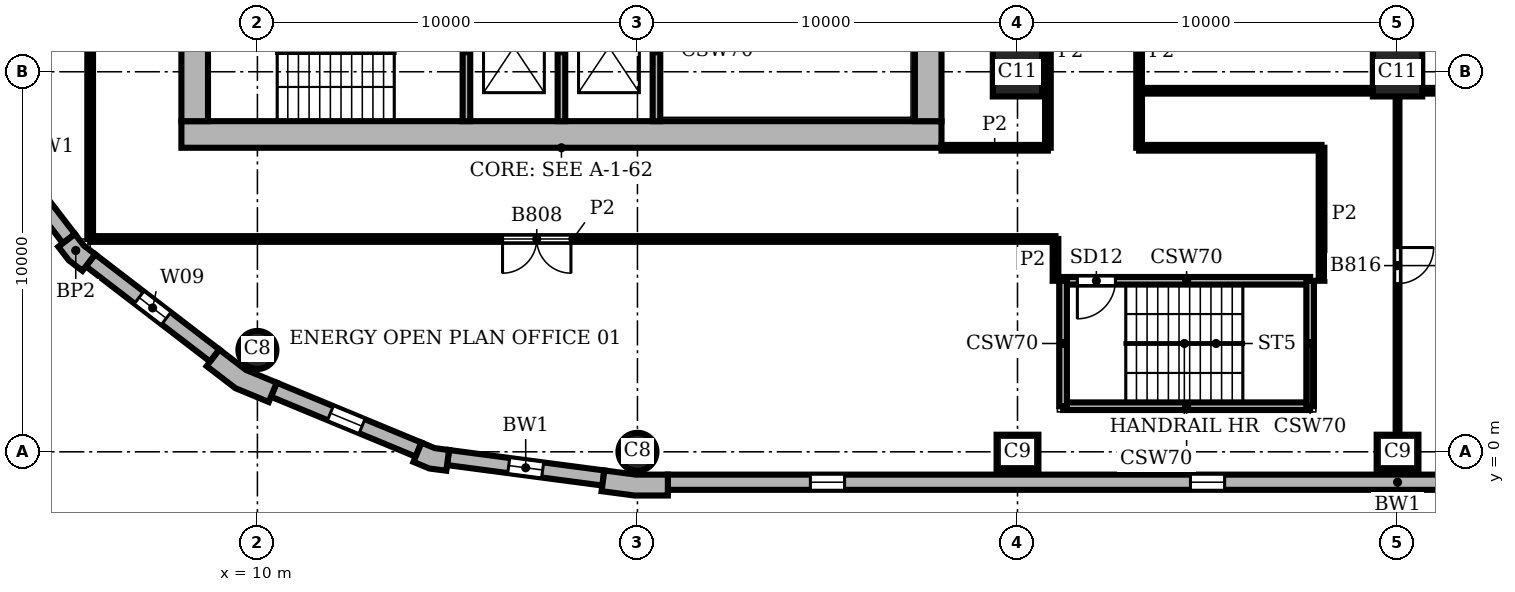
"""IFC4 building model, lengths in metres.
Left out: names, types, materials, properties, quantities, classifications, styles, units other than length and angle.
Written with IfcOpenShell. Run it as: python <this file> out.ifc"""

import sys

from ifc_helpers import new_model, si_unit, direction, frame, frame_2d, origin, origin_2d, place, context, subcontext, project, spatial, polyline, rectangle, circle, outline, extrude, element, fill, save


model = new_model("IFC4")
c1 = context("Model", 3, precision=1e-05, world=origin(), true_north=direction((0.0, 1.0)))
c2 = subcontext(c1, "Body", "Model", "MODEL_VIEW")
j1 = project(units=[si_unit("LENGTHUNIT", "METRE"), si_unit("PLANEANGLEUNIT", "RADIAN")], contexts=[c1])
p1 = place(None, origin())
s1 = spatial("IfcSite", under=j1, at=p1, CompositionType="ELEMENT")
p2 = place(p1, origin())
s2 = spatial("IfcBuilding", under=s1, at=p2, CompositionType="ELEMENT")
p3 = place(p2, frame((0.0, 0.0, 213.6)))
s3 = spatial("IfcBuildingStorey", under=s2, at=p3, CompositionType="ELEMENT", Elevation=213.6)
p4 = place(p3, frame((20.0, 0.0, 0.0), z_axis=(0.0, 0.0, 1.0), x_axis=(1.0, 0.0, 0.0)))
e1 = element("IfcColumn", 1, at=p4, inside=s3, PredefinedType="COLUMN", context=c2, shape_type="SweptSolid", body=[
    extrude(circle(Radius=0.5, at=origin_2d()), origin(), (0.0, 0.0, 1.0), 3.9),
])
for number, where, z_axis, x_axis in (
    (2, (30.0, 0.0, 0.0), (0.0, 0.0, 1.0), (1.0, 0.0, 0.0)),
    (3, (40.0, 0.0, 0.0), (0.0, 0.0, 1.0), (1.0, 0.0, 0.0)),
):
    element("IfcColumn", number, at=place(p3, frame(where, z_axis=z_axis, x_axis=x_axis)), inside=s3, PredefinedType="COLUMN", context=c2, shape_type="SweptSolid", body=[
        extrude(rectangle(XDim=1.1, YDim=0.9, at=origin_2d()), origin(), (0.0, 0.0, 1.0), 3.9),
    ])
p5 = place(p3, frame((10.0, 2.679, 0.0), z_axis=(0.0, 0.0, 1.0), x_axis=(1.0, 0.0, 0.0)))
e4 = element("IfcColumn", 4, at=p5, inside=s3, PredefinedType="COLUMN", context=c2, shape_type="SweptSolid", body=[
    extrude(circle(Radius=0.5, at=origin_2d()), origin(), (0.0, 0.0, 1.0), 3.9),
])
for number, where, z_axis, x_axis in (
    (5, (30.0, 10.0, 0.0), (0.0, 0.0, 1.0), (1.0, 0.0, 0.0)),
    (6, (40.0, 10.0, 0.0), (0.0, 0.0, 1.0), (1.0, 0.0, 0.0)),
):
    element("IfcColumn", number, at=place(p3, frame(where, z_axis=z_axis, x_axis=x_axis)), inside=s3, PredefinedType="COLUMN", context=c2, shape_type="SweptSolid", body=[
        extrude(rectangle(XDim=1.3, YDim=1.3, at=origin_2d()), origin(), (0.0, 0.0, 1.0), 3.9),
    ])
p6 = place(p3, frame((8.0, 8.35, 0.0), z_axis=(0.0, 0.0, 1.0), x_axis=(1.0, 0.0, 0.0)))
e7 = element("IfcWall", 7, at=p6, inside=s3, PredefinedType="SHEAR", context=c2, shape_type="SweptSolid", body=[
    extrude(rectangle(XDim=20.0, YDim=0.7, at=frame_2d((10.0, 0.0))), origin(), (0.0, 0.0, 1.0), 3.9),
])
p7 = place(p3, frame((27.65, 8.7, 0.0), z_axis=(0.0, 0.0, 1.0), x_axis=(0.0, 1.0, 0.0)))
e8 = element("IfcWall", 8, at=p7, inside=s3, PredefinedType="SHEAR", context=c2, shape_type="SweptSolid", body=[
    extrude(rectangle(XDim=18.6, YDim=0.7, at=frame_2d((9.3, 0.0))), origin(), (0.0, 0.0, 1.0), 3.9),
])
p8 = place(p7, frame((4.75, 0.0, 0.0)))
e9 = element("IfcOpeningElement", 9, at=p8, cuts=e8, PredefinedType="OPENING", context=c2, shape_type="SweptSolid", body=[
    extrude(rectangle(XDim=1.6, YDim=2.1, at=frame_2d((0.8, 1.05))), frame((0.0, 0.36, 0.0), z_axis=(0.0, -1.0, 0.0), x_axis=(1.0, 0.0, 0.0)), (0.0, 0.0, 1.0), 0.72),
])
p9 = place(p3, frame((8.35, 27.3, 0.0), z_axis=(0.0, 0.0, 1.0), x_axis=(0.0, -1.0, 0.0)))
e10 = element("IfcWall", 10, at=p9, inside=s3, PredefinedType="SHEAR", context=c2, shape_type="SweptSolid", body=[
    extrude(rectangle(XDim=18.6, YDim=0.7, at=frame_2d((9.3, 0.0))), origin(), (0.0, 0.0, 1.0), 3.9),
])
p10 = place(p3, origin())
e11 = element("IfcWall", 11, at=p10, inside=s3, PredefinedType="SOLIDWALL", context=c2, shape_type="SweptSolid", body=[
    extrude(outline(polyline([(19.076, -0.887), (19.057, -1.036), (19.925, -1.15), (20.8, -1.15), (20.8, -1.0), (20.8, -0.6), (19.961, -0.6), (19.128, -0.49), (19.076, -0.887)])), origin(), (0.0, 0.0, 1.0), 3.9),
])
e12 = element("IfcWall", 12, at=p10, inside=s3, PredefinedType="SOLIDWALL", context=c2, shape_type="SweptSolid", body=[
    extrude(outline(polyline([(4.882, 5.487), (4.763, 5.396), (5.038, 5.038), (5.396, 4.763), (5.487, 4.882), (5.731, 5.199), (5.43, 5.43), (5.199, 5.731), (4.882, 5.487)])), origin(), (0.0, 0.0, 1.0), 3.9),
])
e13 = element("IfcWall", 13, at=p10, inside=s3, PredefinedType="SOLIDWALL", context=c2, shape_type="SweptSolid", body=[
    extrude(outline(polyline([(8.757, 2.373), (8.665, 2.254), (9.42, 1.675), (10.299, 1.311), (10.356, 1.449), (10.51, 1.819), (9.698, 2.155), (9.0, 2.69), (8.757, 2.373)])), origin(), (0.0, 0.0, 1.0), 3.9),
])
e14 = element("IfcWall", 14, at=p10, inside=s3, PredefinedType="SOLIDWALL", context=c2, shape_type="SweptSolid", body=[
    extrude(outline(polyline([(14.164, -0.128), (14.106, -0.266), (14.523, -0.439), (14.971, -0.498), (14.99, -0.349), (15.043, 0.047), (14.667, 0.097), (14.317, 0.242), (14.164, -0.128)])), origin(), (0.0, 0.0, 1.0), 3.9),
])
p11 = place(p3, frame((20.8, -0.8, 0.0), z_axis=(0.0, 0.0, 1.0), x_axis=(1.0, 0.0, 0.0)))
e15 = element("IfcWall", 15, at=p11, inside=s3, PredefinedType="SOLIDWALL", context=c2, shape_type="SweptSolid", body=[
    extrude(rectangle(XDim=38.4, YDim=0.4, at=frame_2d((19.2, 0.0))), origin(), (0.0, 0.0, 1.0), 3.9),
])
p12 = place(p11, frame((3.75, 0.0, 0.9)))
e16 = element("IfcOpeningElement", 16, at=p12, cuts=e15, PredefinedType="OPENING", context=c2, shape_type="SweptSolid", body=[
    extrude(rectangle(XDim=0.9, YDim=2.35, at=frame_2d((0.45, 1.175))), frame((0.0, 0.21, 0.0), z_axis=(0.0, -1.0, 0.0), x_axis=(1.0, 0.0, 0.0)), (0.0, 0.0, 1.0), 0.42),
])
p13 = place(p11, frame((13.75, 0.0, 0.9)))
e17 = element("IfcOpeningElement", 17, at=p13, cuts=e15, PredefinedType="OPENING", context=c2, shape_type="SweptSolid", body=[
    extrude(rectangle(XDim=0.9, YDim=2.35, at=frame_2d((0.45, 1.175))), frame((0.0, 0.21, 0.0), z_axis=(0.0, -1.0, 0.0), x_axis=(1.0, 0.0, 0.0)), (0.0, 0.0, 1.0), 0.42),
])
p14 = place(p11, frame((23.75, 0.0, 0.9)))
e18 = element("IfcOpeningElement", 18, at=p14, cuts=e15, PredefinedType="OPENING", context=c2, shape_type="SweptSolid", body=[
    extrude(rectangle(XDim=0.9, YDim=2.35, at=frame_2d((0.45, 1.175))), frame((0.0, 0.21, 0.0), z_axis=(0.0, -1.0, 0.0), x_axis=(1.0, 0.0, 0.0)), (0.0, 0.0, 1.0), 0.42),
])
p15 = place(p11, frame((33.75, 0.0, 0.9)))
e19 = element("IfcOpeningElement", 19, at=p15, cuts=e15, PredefinedType="OPENING", context=c2, shape_type="SweptSolid", body=[
    extrude(rectangle(XDim=0.9, YDim=2.35, at=frame_2d((0.45, 1.175))), frame((0.0, 0.21, 0.0), z_axis=(0.0, -1.0, 0.0), x_axis=(1.0, 0.0, 0.0)), (0.0, 0.0, 1.0), 0.42),
])
p16 = place(p3, frame((2.532, 8.878, 0.0), z_axis=(0.0, 0.0, 1.0), x_axis=(0.608759824817, -0.793354571229, 0.0)))
e20 = element("IfcWall", 20, at=p16, inside=s3, PredefinedType="SOLIDWALL", context=c2, shape_type="SweptSolid", body=[
    extrude(rectangle(XDim=4.121, YDim=0.4, at=frame_2d((2.061, 0.0))), origin(), (0.0, 0.0, 1.0), 3.9),
])
p17 = place(p16, frame((1.611, 0.0, 0.9)))
e21 = element("IfcOpeningElement", 21, at=p17, cuts=e20, PredefinedType="OPENING", context=c2, shape_type="SweptSolid", body=[
    extrude(rectangle(XDim=0.9, YDim=2.35, at=frame_2d((0.45, 1.175))), frame((0.0, 0.21, 0.0), z_axis=(0.0, -1.0, 0.0), x_axis=(1.0, 0.0, 0.0)), (0.0, 0.0, 1.0), 0.42),
])
p18 = place(p3, frame((5.609, 5.041, 0.0), z_axis=(0.0, 0.0, 1.0), x_axis=(0.793354571229, -0.608759824817, 0.0)))
e22 = element("IfcWall", 22, at=p18, inside=s3, PredefinedType="SOLIDWALL", context=c2, shape_type="SweptSolid", body=[
    extrude(rectangle(XDim=4.121, YDim=0.4, at=frame_2d((2.061, 0.0))), origin(), (0.0, 0.0, 1.0), 3.9),
])
p19 = place(p18, frame((1.611, 0.0, 0.9)))
e23 = element("IfcOpeningElement", 23, at=p19, cuts=e22, PredefinedType="OPENING", context=c2, shape_type="SweptSolid", body=[
    extrude(rectangle(XDim=0.9, YDim=2.35, at=frame_2d((0.45, 1.175))), frame((0.0, 0.21, 0.0), z_axis=(0.0, -1.0, 0.0), x_axis=(1.0, 0.0, 0.0)), (0.0, 0.0, 1.0), 0.42),
])
p20 = place(p3, frame((10.433, 1.634, 0.0), z_axis=(0.0, 0.0, 1.0), x_axis=(0.923863744394, -0.382721546029, 0.0)))
e24 = element("IfcWall", 24, at=p20, inside=s3, PredefinedType="SOLIDWALL", context=c2, shape_type="SweptSolid", body=[
    extrude(rectangle(XDim=4.121, YDim=0.4, at=frame_2d((2.061, 0.0))), origin(), (0.0, 0.0, 1.0), 3.9),
])
p21 = place(p20, frame((1.611, 0.0, 0.9)))
e25 = element("IfcOpeningElement", 25, at=p21, cuts=e24, PredefinedType="OPENING", context=c2, shape_type="SweptSolid", body=[
    extrude(rectangle(XDim=0.9, YDim=2.35, at=frame_2d((0.45, 1.175))), frame((0.0, 0.21, 0.0), z_axis=(0.0, -1.0, 0.0), x_axis=(1.0, 0.0, 0.0)), (0.0, 0.0, 1.0), 0.42),
])
p22 = place(p3, frame((15.017, -0.151, 0.0), z_axis=(0.0, 0.0, 1.0), x_axis=(0.991446429508, -0.130514280502, 0.0)))
e26 = element("IfcWall", 26, at=p22, inside=s3, PredefinedType="SOLIDWALL", context=c2, shape_type="SweptSolid", body=[
    extrude(rectangle(XDim=4.121, YDim=0.4, at=frame_2d((2.061, 0.0))), origin(), (0.0, 0.0, 1.0), 3.9),
])
p23 = place(p22, frame((1.611, 0.0, 0.9)))
e27 = element("IfcOpeningElement", 27, at=p23, cuts=e26, PredefinedType="OPENING", context=c2, shape_type="SweptSolid", body=[
    extrude(rectangle(XDim=0.9, YDim=2.35, at=frame_2d((0.45, 1.175))), frame((0.0, 0.21, 0.0), z_axis=(0.0, -1.0, 0.0), x_axis=(1.0, 0.0, 0.0)), (0.0, 0.0, 1.0), 0.42),
])
p24 = place(p3, frame((31.2, 1.2, 0.0), z_axis=(0.0, 0.0, 1.0), x_axis=(1.0, 0.0, 0.0)))
e28 = element("IfcWall", 28, at=p24, inside=s3, PredefinedType="SHEAR", context=c2, shape_type="SweptSolid", body=[
    extrude(rectangle(XDim=6.5, YDim=0.2, at=frame_2d((3.25, 0.0))), origin(), (0.0, 0.0, 1.0), 3.58),
])
p25 = place(p3, frame((31.2, 4.5, 0.0), z_axis=(0.0, 0.0, 1.0), x_axis=(1.0, 0.0, 0.0)))
e29 = element("IfcWall", 29, at=p25, inside=s3, PredefinedType="SHEAR", context=c2, shape_type="SweptSolid", body=[
    extrude(rectangle(XDim=6.5, YDim=0.2, at=frame_2d((3.25, 0.0))), origin(), (0.0, 0.0, 1.0), 3.58),
])
p26 = place(p25, frame((0.375, 0.0, 0.0)))
e30 = element("IfcOpeningElement", 30, at=p26, cuts=e29, PredefinedType="OPENING", context=c2, shape_type="SweptSolid", body=[
    extrude(rectangle(XDim=1.0, YDim=2.1, at=frame_2d((0.5, 1.05))), frame((0.0, 0.11, 0.0), z_axis=(0.0, -1.0, 0.0), x_axis=(1.0, 0.0, 0.0)), (0.0, 0.0, 1.0), 0.22),
])
for number, where, z_axis, x_axis in (
    (31, (15.5, 8.7, 0.0), (0.0, 0.0, 1.0), (0.0, 1.0, 0.0)),
    (32, (18.0, 8.7, 0.0), (0.0, 0.0, 1.0), (0.0, 1.0, 0.0)),
    (33, (20.5, 8.7, 0.0), (0.0, 0.0, 1.0), (0.0, 1.0, 0.0)),
):
    element("IfcWall", number, at=place(p3, frame(where, z_axis=z_axis, x_axis=x_axis)), inside=s3, PredefinedType="SHEAR", context=c2, shape_type="SweptSolid", body=[
        extrude(rectangle(XDim=3.7, YDim=0.2, at=frame_2d((1.85, 0.0))), origin(), (0.0, 0.0, 1.0), 3.58),
    ])
for number, where, z_axis, x_axis in (
    (34, (31.2, 1.2, 0.0), (0.0, 0.0, 1.0), (0.0, 1.0, 0.0)),
    (35, (37.7, 1.2, 0.0), (0.0, 0.0, 1.0), (0.0, 1.0, 0.0)),
):
    element("IfcWall", number, at=place(p3, frame(where, z_axis=z_axis, x_axis=x_axis)), inside=s3, PredefinedType="SHEAR", context=c2, shape_type="SweptSolid", body=[
        extrude(rectangle(XDim=3.3, YDim=0.2, at=frame_2d((1.65, 0.0))), origin(), (0.0, 0.0, 1.0), 3.58),
    ])
p27 = place(p3, frame((40.0, 0.45, 0.0), z_axis=(0.0, 0.0, 1.0), x_axis=(0.0, 1.0, 0.0)))
e36 = element("IfcWall", 36, at=p27, inside=s3, PredefinedType="PARTITIONING", context=c2, shape_type="SweptSolid", body=[
    extrude(rectangle(XDim=8.9, YDim=0.1, at=frame_2d((4.45, 0.0))), origin(), (0.0, 0.0, 1.0), 3.58),
])
p28 = place(p27, frame((3.975, 0.0, 0.0)))
e37 = element("IfcOpeningElement", 37, at=p28, cuts=e36, PredefinedType="OPENING", context=c2, shape_type="SweptSolid", body=[
    extrude(rectangle(XDim=0.95, YDim=2.1, at=frame_2d((0.475, 1.05))), frame((0.0, 0.06, 0.0), z_axis=(0.0, -1.0, 0.0), x_axis=(1.0, 0.0, 0.0)), (0.0, 0.0, 1.0), 0.12),
])
p29 = place(p3, frame((5.6, 5.6, 0.0), z_axis=(0.0, 0.0, 1.0), x_axis=(0.0, 1.0, 0.0)))
e38 = element("IfcWall", 38, at=p29, inside=s3, PredefinedType="PARTITIONING", context=c2, shape_type="SweptSolid", body=[
    extrude(rectangle(XDim=22.4, YDim=0.15, at=frame_2d((11.2, 0.0))), origin(), (0.0, 0.0, 1.0), 3.58),
])
p30 = place(p29, frame((5.35, 0.0, 0.0)))
e39 = element("IfcOpeningElement", 39, at=p30, cuts=e38, PredefinedType="OPENING", context=c2, shape_type="SweptSolid", body=[
    extrude(rectangle(XDim=1.0, YDim=2.1, at=frame_2d((0.5, 1.05))), frame((0.0, 0.085, 0.0), z_axis=(0.0, -1.0, 0.0), x_axis=(1.0, 0.0, 0.0)), (0.0, 0.0, 1.0), 0.17),
])
p31 = place(p29, frame((11.5, 0.0, 0.0)))
e40 = element("IfcOpeningElement", 40, at=p31, cuts=e38, PredefinedType="OPENING", context=c2, shape_type="SweptSolid", body=[
    extrude(rectangle(XDim=0.8, YDim=2.1, at=frame_2d((0.4, 1.05))), frame((0.0, 0.085, 0.0), z_axis=(0.0, -1.0, 0.0), x_axis=(1.0, 0.0, 0.0)), (0.0, 0.0, 1.0), 0.17),
])
p32 = place(p29, frame((17.5, 0.0, 0.0)))
e41 = element("IfcOpeningElement", 41, at=p32, cuts=e38, PredefinedType="OPENING", context=c2, shape_type="SweptSolid", body=[
    extrude(rectangle(XDim=1.8, YDim=2.1, at=frame_2d((0.9, 1.05))), frame((0.0, 0.085, 0.0), z_axis=(0.0, -1.0, 0.0), x_axis=(1.0, 0.0, 0.0)), (0.0, 0.0, 1.0), 0.17),
])
p33 = place(p3, frame((30.8, 8.001, 0.0), z_axis=(0.0, 0.0, 1.0), x_axis=(0.0, 1.0, 0.0)))
e42 = element("IfcWall", 42, at=p33, inside=s3, PredefinedType="PARTITIONING", context=c2, shape_type="SweptSolid", body=[
    extrude(rectangle(XDim=5.048, YDim=0.15, at=frame_2d((2.524, 0.0))), origin(), (0.0, 0.0, 1.0), 3.58),
])
p34 = place(p33, frame((3.35, 0.0, 0.0)))
e43 = element("IfcOpeningElement", 43, at=p34, cuts=e42, PredefinedType="OPENING", context=c2, shape_type="SweptSolid", body=[
    extrude(rectangle(XDim=1.0, YDim=2.1, at=frame_2d((0.5, 1.05))), frame((0.0, 0.085, 0.0), z_axis=(0.0, -1.0, 0.0), x_axis=(1.0, 0.0, 0.0)), (0.0, 0.0, 1.0), 0.17),
])
p35 = place(p3, frame((31.0, 4.5, 0.0), z_axis=(0.0, 0.0, 1.0), x_axis=(0.0, 1.0, 0.0)))
e44 = element("IfcWall", 44, at=p35, inside=s3, PredefinedType="PARTITIONING", context=c2, shape_type="SweptSolid", body=[
    extrude(rectangle(XDim=1.1, YDim=0.15, at=frame_2d((0.55, 0.0))), origin(), (0.0, 0.0, 1.0), 3.58),
])
p36 = place(p3, frame((33.2, 8.0, 0.0), z_axis=(0.0, 0.0, 1.0), x_axis=(0.0, 1.0, 0.0)))
e45 = element("IfcWall", 45, at=p36, inside=s3, PredefinedType="PARTITIONING", context=c2, shape_type="SweptSolid", body=[
    extrude(rectangle(XDim=5.05, YDim=0.15, at=frame_2d((2.525, 0.0))), origin(), (0.0, 0.0, 1.0), 3.58),
])
p37 = place(p3, frame((38.0, 4.5, 0.0), z_axis=(0.0, 0.0, 1.0), x_axis=(0.0, 1.0, 0.0)))
e46 = element("IfcWall", 46, at=p37, inside=s3, PredefinedType="PARTITIONING", context=c2, shape_type="SweptSolid", body=[
    extrude(rectangle(XDim=3.5, YDim=0.15, at=frame_2d((1.75, 0.0))), origin(), (0.0, 0.0, 1.0), 3.58),
])
p38 = place(p3, frame((5.6, 5.6, 0.0), z_axis=(0.0, 0.0, 1.0), x_axis=(1.0, 0.0, 0.0)))
e47 = element("IfcWall", 47, at=p38, inside=s3, PredefinedType="PARTITIONING", context=c2, shape_type="SweptSolid", body=[
    extrude(rectangle(XDim=25.4, YDim=0.15, at=frame_2d((12.7, 0.0))), origin(), (0.0, 0.0, 1.0), 3.58),
])
p39 = place(p38, frame((10.85, 0.0, 0.0)))
e48 = element("IfcOpeningElement", 48, at=p39, cuts=e47, PredefinedType="OPENING", context=c2, shape_type="SweptSolid", body=[
    extrude(rectangle(XDim=1.8, YDim=2.1, at=frame_2d((0.9, 1.05))), frame((0.0, 0.085, 0.0), z_axis=(0.0, -1.0, 0.0), x_axis=(1.0, 0.0, 0.0)), (0.0, 0.0, 1.0), 0.17),
])
p40 = place(p3, frame((28.0, 8.0, 0.0), z_axis=(0.0, 0.0, 1.0), x_axis=(1.0, 0.0, 0.0)))
e49 = element("IfcWall", 49, at=p40, inside=s3, PredefinedType="PARTITIONING", context=c2, shape_type="SweptSolid", body=[
    extrude(rectangle(XDim=2.799, YDim=0.15, at=frame_2d((1.399, 0.0))), origin(), (0.0, 0.0, 1.0), 3.58),
])
p41 = place(p3, frame((33.2, 8.0, 0.0), z_axis=(0.0, 0.0, 1.0), x_axis=(1.0, 0.0, 0.0)))
e50 = element("IfcWall", 50, at=p41, inside=s3, PredefinedType="PARTITIONING", context=c2, shape_type="SweptSolid", body=[
    extrude(rectangle(XDim=4.8, YDim=0.15, at=frame_2d((2.4, 0.0))), origin(), (0.0, 0.0, 1.0), 3.58),
])
p42 = place(p3, frame((33.2, 9.5, 0.0), z_axis=(0.0, 0.0, 1.0), x_axis=(1.0, 0.0, 0.0)))
e51 = element("IfcWall", 51, at=p42, inside=s3, PredefinedType="PARTITIONING", context=c2, shape_type="SweptSolid", body=[
    extrude(rectangle(XDim=6.15, YDim=0.15, at=frame_2d((3.075, 0.0))), origin(), (0.0, 0.0, 1.0), 3.58),
])
p43 = place(p3, frame((40.65, 9.5, 0.0), z_axis=(0.0, 0.0, 1.0), x_axis=(1.0, 0.0, 0.0)))
e52 = element("IfcWall", 52, at=p43, inside=s3, PredefinedType="PARTITIONING", context=c2, shape_type="SweptSolid", body=[
    extrude(rectangle(XDim=8.7, YDim=0.15, at=frame_2d((4.35, 0.0))), origin(), (0.0, 0.0, 1.0), 3.58),
])
p44 = place(p12, origin())
e53 = element("IfcWindow", 53, at=p44, inside=s3, PartitioningType="SINGLE_PANEL", PredefinedType="WINDOW", context=c2, shape_type="SweptSolid", body=[
    extrude(rectangle(XDim=0.9, YDim=2.35, at=frame_2d((0.45, 1.175))), frame((0.0, 0.16, 0.0), z_axis=(0.0, -1.0, 0.0), x_axis=(1.0, 0.0, 0.0)), (0.0, 0.0, 1.0), 0.06),
])
fill(e16, e53)
p45 = place(p13, origin())
e54 = element("IfcWindow", 54, at=p45, inside=s3, PartitioningType="SINGLE_PANEL", PredefinedType="WINDOW", context=c2, shape_type="SweptSolid", body=[
    extrude(rectangle(XDim=0.9, YDim=2.35, at=frame_2d((0.45, 1.175))), frame((0.0, 0.16, 0.0), z_axis=(0.0, -1.0, 0.0), x_axis=(1.0, 0.0, 0.0)), (0.0, 0.0, 1.0), 0.06),
])
fill(e17, e54)
p46 = place(p19, origin())
e55 = element("IfcWindow", 55, at=p46, inside=s3, PartitioningType="SINGLE_PANEL", PredefinedType="WINDOW", context=c2, shape_type="SweptSolid", body=[
    extrude(rectangle(XDim=0.9, YDim=2.35, at=frame_2d((0.45, 1.175))), frame((0.0, 0.16, 0.0), z_axis=(0.0, -1.0, 0.0), x_axis=(1.0, 0.0, 0.0)), (0.0, 0.0, 1.0), 0.06),
])
fill(e23, e55)
p47 = place(p21, origin())
e56 = element("IfcWindow", 56, at=p47, inside=s3, PartitioningType="SINGLE_PANEL", PredefinedType="WINDOW", context=c2, shape_type="SweptSolid", body=[
    extrude(rectangle(XDim=0.9, YDim=2.35, at=frame_2d((0.45, 1.175))), frame((0.0, 0.16, 0.0), z_axis=(0.0, -1.0, 0.0), x_axis=(1.0, 0.0, 0.0)), (0.0, 0.0, 1.0), 0.06),
])
fill(e25, e56)
p48 = place(p23, origin())
e57 = element("IfcWindow", 57, at=p48, inside=s3, PartitioningType="SINGLE_PANEL", PredefinedType="WINDOW", context=c2, shape_type="SweptSolid", body=[
    extrude(rectangle(XDim=0.9, YDim=2.35, at=frame_2d((0.45, 1.175))), frame((0.0, 0.16, 0.0), z_axis=(0.0, -1.0, 0.0), x_axis=(1.0, 0.0, 0.0)), (0.0, 0.0, 1.0), 0.06),
])
fill(e27, e57)
p49 = place(p26, frame((1.0, 0.0, 0.0), z_axis=(0.0, 0.0, 1.0), x_axis=(-1.0, 0.0, 0.0)))
e58 = element("IfcDoor", 58, at=p49, inside=s3, OperationType="SINGLE_SWING_RIGHT", PredefinedType="DOOR", context=c2, shape_type="SweptSolid", body=[
    extrude(rectangle(XDim=1.0, YDim=2.1, at=frame_2d((0.5, 1.05))), frame((0.0, 0.025, 0.0), z_axis=(0.0, -1.0, 0.0), x_axis=(1.0, 0.0, 0.0)), (0.0, 0.0, 1.0), 0.05),
])
fill(e30, e58)
p50 = place(p39, frame((1.8, 0.0, 0.0), z_axis=(0.0, 0.0, 1.0), x_axis=(-1.0, 0.0, 0.0)))
e59 = element("IfcDoor", 59, at=p50, inside=s3, OperationType="DOUBLE_DOOR_SINGLE_SWING", PredefinedType="DOOR", context=c2, shape_type="SweptSolid", body=[
    extrude(rectangle(XDim=1.8, YDim=2.1, at=frame_2d((0.9, 1.05))), frame((0.0, 0.025, 0.0), z_axis=(0.0, -1.0, 0.0), x_axis=(1.0, 0.0, 0.0)), (0.0, 0.0, 1.0), 0.05),
])
fill(e48, e59)
p51 = place(p28, frame((0.95, 0.0, 0.0), z_axis=(0.0, 0.0, 1.0), x_axis=(-1.0, 0.0, 0.0)))
e60 = element("IfcDoor", 60, at=p51, inside=s3, OperationType="SINGLE_SWING_LEFT", PredefinedType="DOOR", context=c2, shape_type="SweptSolid", body=[
    extrude(rectangle(XDim=0.95, YDim=2.1, at=frame_2d((0.475, 1.05))), frame((0.0, 0.025, 0.0), z_axis=(0.0, -1.0, 0.0), x_axis=(1.0, 0.0, 0.0)), (0.0, 0.0, 1.0), 0.05),
])
fill(e37, e60)
save(model, sys.argv[1])
